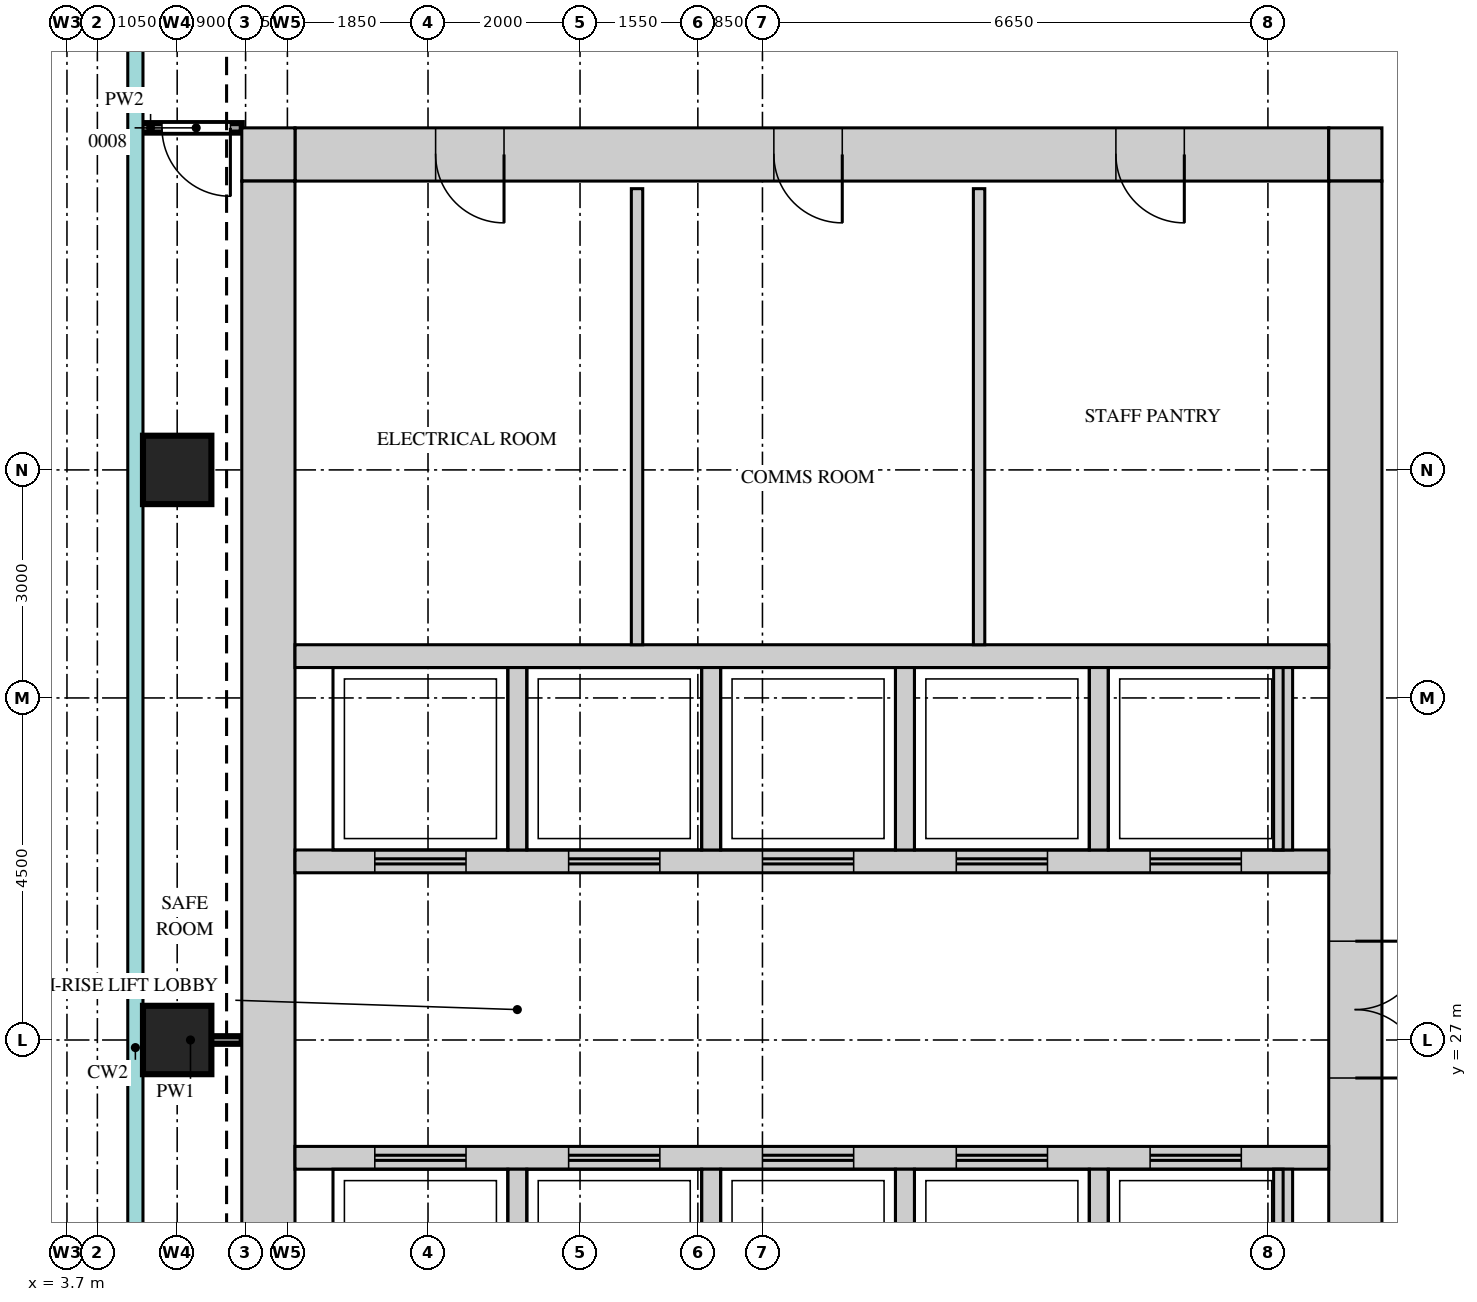
"""IFC4 building model, lengths in metres.
Left out: names, types, materials, properties, quantities, classifications, styles, units other than length and angle.
Written with IfcOpenShell. Run it as: python <this file> out.ifc"""

import sys

from ifc_helpers import new_model, si_unit, direction, frame, frame_2d, origin, origin_2d, place, context, subcontext, project, spatial, rectangle, extrude, source, transform, mapped, element, fill, save


model = new_model("IFC4")
c1 = context("Model", 3, precision=1e-05, world=origin(), true_north=direction((0.0, 1.0)))
c2 = subcontext(c1, "Body", "Model", "MODEL_VIEW")
j1 = project(units=[si_unit("LENGTHUNIT", "METRE"), si_unit("PLANEANGLEUNIT", "RADIAN")], contexts=[c1])
p1 = place(None, origin())
s1 = spatial("IfcSite", under=j1, at=p1, CompositionType="ELEMENT")
p2 = place(p1, origin())
s2 = spatial("IfcBuilding", under=s1, at=p2, CompositionType="ELEMENT")
p3 = place(p2, frame((0.0, 0.0, 238.2)))
s3 = spatial("IfcBuildingStorey", under=s2, at=p3, CompositionType="ELEMENT", Elevation=238.2)
m1 = source(origin(), c2, "Body", "SweptSolid", [
    extrude(rectangle(XDim=13.6, YDim=0.7, at=frame_2d((6.8, 0.0))), origin(), (0.0, 0.0, 1.0), 3.75),
])
p4 = place(p3, frame((6.7, 38.65, 0.0), z_axis=(0.0, 0.0, 1.0), x_axis=(1.0, 0.0, 0.0)))
e1 = element("IfcWall", 1, at=p4, inside=s3, PredefinedType="SHEAR", context=c2, shape_type="MappedRepresentation", body=[
    mapped(m1, transform((0.0, 0.0, 0.0))),
])
m2 = source(origin(), c2, "Body", "SweptSolid", [
    extrude(rectangle(XDim=0.9, YDim=2.1, at=frame_2d((0.45, 1.05))), frame((0.0, 0.36, 0.0), z_axis=(0.0, -1.0, 0.0), x_axis=(1.0, 0.0, 0.0)), (0.0, 0.0, 1.0), 0.72),
])
p5 = place(p4, frame((1.85, 0.0, 0.0)))
e2 = element("IfcOpeningElement", 2, at=p5, cuts=e1, PredefinedType="OPENING", context=c2, shape_type="MappedRepresentation", body=[
    mapped(m2, transform((0.0, 0.0, 0.0))),
])
p6 = place(p4, frame((6.3, 0.0, 0.0)))
e3 = element("IfcOpeningElement", 3, at=p6, cuts=e1, PredefinedType="OPENING", context=c2, shape_type="MappedRepresentation", body=[
    mapped(m2, transform((0.0, 0.0, 0.0))),
])
p7 = place(p4, frame((10.8, 0.0, 0.0)))
e4 = element("IfcOpeningElement", 4, at=p7, cuts=e1, PredefinedType="OPENING", context=c2, shape_type="MappedRepresentation", body=[
    mapped(m2, transform((0.0, 0.0, 0.0))),
])
m3 = source(origin(), c2, "Body", "SweptSolid", [
    extrude(rectangle(XDim=0.7, YDim=0.7, at=frame_2d((0.35, 0.0))), origin(), (0.0, 0.0, 1.0), 3.75),
])
for number, where, z_axis, x_axis in (
    (5, (20.3, 38.65, 0.0), (0.0, 0.0, 1.0), (1.0, 0.0, 0.0)),
    (6, (6.0, 38.65, 0.0), (0.0, 0.0, 1.0), (1.0, 0.0, 0.0)),
):
    element("IfcWall", number, at=place(p3, frame(where, z_axis=z_axis, x_axis=x_axis)), inside=s3, PredefinedType="SHEAR", context=c2, shape_type="MappedRepresentation", body=[
        mapped(m3, transform((0.0, 0.0, 0.0))),
    ])
m4 = source(origin(), c2, "Body", "SweptSolid", [
    extrude(rectangle(XDim=22.6, YDim=0.7, at=frame_2d((11.3, 0.0))), origin(), (0.0, 0.0, 1.0), 3.75),
])
p8 = place(p3, frame((20.65, 15.7, 0.0), z_axis=(0.0, 0.0, 1.0), x_axis=(0.0, 1.0, 0.0)))
e7 = element("IfcWall", 7, at=p8, inside=s3, PredefinedType="SHEAR", context=c2, shape_type="MappedRepresentation", body=[
    mapped(m4, transform((0.0, 0.0, 0.0))),
])
m5 = source(origin(), c2, "Body", "SweptSolid", [
    extrude(rectangle(XDim=1.8, YDim=2.1, at=frame_2d((0.9, 1.05))), frame((0.0, 0.36, 0.0), z_axis=(0.0, -1.0, 0.0), x_axis=(1.0, 0.0, 0.0)), (0.0, 0.0, 1.0), 0.72),
])
p9 = place(p8, frame((10.8, 0.0, 0.0)))
e8 = element("IfcOpeningElement", 8, at=p9, cuts=e7, PredefinedType="OPENING", context=c2, shape_type="MappedRepresentation", body=[
    mapped(m5, transform((0.0, 0.0, 0.0))),
])
p10 = place(p8, frame((0.45, 0.0, 0.0)))
e9 = element("IfcOpeningElement", 9, at=p10, cuts=e7, PredefinedType="OPENING", context=c2, shape_type="MappedRepresentation", body=[
    mapped(m2, transform((0.0, 0.0, 0.0))),
])
m6 = source(origin(), c2, "Body", "SweptSolid", [
    extrude(rectangle(XDim=1.0, YDim=2.1, at=frame_2d((0.5, 1.05))), frame((0.0, 0.36, 0.0), z_axis=(0.0, -1.0, 0.0), x_axis=(1.0, 0.0, 0.0)), (0.0, 0.0, 1.0), 0.72),
])
p11 = place(p8, frame((2.2, 0.0, 0.0)))
e10 = element("IfcOpeningElement", 10, at=p11, cuts=e7, PredefinedType="OPENING", context=c2, shape_type="MappedRepresentation", body=[
    mapped(m6, transform((0.0, 0.0, 0.0))),
])
p12 = place(p8, frame((5.0, 0.0, 0.0)))
e11 = element("IfcOpeningElement", 11, at=p12, cuts=e7, PredefinedType="OPENING", context=c2, shape_type="MappedRepresentation", body=[
    mapped(m2, transform((0.0, 0.0, 0.0))),
])
p13 = place(p3, frame((6.35, 15.7, 0.0), z_axis=(0.0, 0.0, 1.0), x_axis=(0.0, 1.0, 0.0)))
e12 = element("IfcWall", 12, at=p13, inside=s3, PredefinedType="SHEAR", context=c2, shape_type="MappedRepresentation", body=[
    mapped(m4, transform((0.0, 0.0, 0.0))),
])
m7 = source(origin(), c2, "Body", "SweptSolid", [
    extrude(rectangle(XDim=13.6, YDim=0.3, at=frame_2d((6.8, 0.0))), origin(), (0.0, 0.0, 1.0), 3.75),
])
p14 = place(p3, frame((6.7, 32.05, 0.0), z_axis=(0.0, 0.0, 1.0), x_axis=(1.0, 0.0, 0.0)))
e13 = element("IfcWall", 13, at=p14, inside=s3, PredefinedType="STANDARD", context=c2, shape_type="MappedRepresentation", body=[
    mapped(m7, transform((0.0, 0.0, 0.0))),
])
p15 = place(p3, frame((6.7, 29.35, 0.0), z_axis=(0.0, 0.0, 1.0), x_axis=(1.0, 0.0, 0.0)))
e14 = element("IfcWall", 14, at=p15, inside=s3, PredefinedType="STANDARD", context=c2, shape_type="MappedRepresentation", body=[
    mapped(m7, transform((0.0, 0.0, 0.0))),
])
m8 = source(origin(), c2, "Body", "SweptSolid", [
    extrude(rectangle(XDim=1.2, YDim=2.1, at=frame_2d((0.6, 1.05))), frame((0.0, 0.16, 0.0), z_axis=(0.0, -1.0, 0.0), x_axis=(1.0, 0.0, 0.0)), (0.0, 0.0, 1.0), 0.32),
])
p16 = place(p15, frame((1.05, 0.0, 0.0)))
e15 = element("IfcOpeningElement", 15, at=p16, cuts=e14, PredefinedType="OPENING", context=c2, shape_type="MappedRepresentation", body=[
    mapped(m8, transform((0.0, 0.0, 0.0))),
])
p17 = place(p15, frame((3.6, 0.0, 0.0)))
e16 = element("IfcOpeningElement", 16, at=p17, cuts=e14, PredefinedType="OPENING", context=c2, shape_type="MappedRepresentation", body=[
    mapped(m8, transform((0.0, 0.0, 0.0))),
])
p18 = place(p15, frame((6.15, 0.0, 0.0)))
e17 = element("IfcOpeningElement", 17, at=p18, cuts=e14, PredefinedType="OPENING", context=c2, shape_type="MappedRepresentation", body=[
    mapped(m8, transform((0.0, 0.0, 0.0))),
])
p19 = place(p15, frame((8.7, 0.0, 0.0)))
e18 = element("IfcOpeningElement", 18, at=p19, cuts=e14, PredefinedType="OPENING", context=c2, shape_type="MappedRepresentation", body=[
    mapped(m8, transform((0.0, 0.0, 0.0))),
])
p20 = place(p15, frame((11.25, 0.0, 0.0)))
e19 = element("IfcOpeningElement", 19, at=p20, cuts=e14, PredefinedType="OPENING", context=c2, shape_type="MappedRepresentation", body=[
    mapped(m8, transform((0.0, 0.0, 0.0))),
])
p21 = place(p3, frame((6.7, 25.45, 0.0), z_axis=(0.0, 0.0, 1.0), x_axis=(1.0, 0.0, 0.0)))
e20 = element("IfcWall", 20, at=p21, inside=s3, PredefinedType="STANDARD", context=c2, shape_type="MappedRepresentation", body=[
    mapped(m7, transform((0.0, 0.0, 0.0))),
])
p22 = place(p21, frame((1.05, 0.0, 0.0)))
e21 = element("IfcOpeningElement", 21, at=p22, cuts=e20, PredefinedType="OPENING", context=c2, shape_type="MappedRepresentation", body=[
    mapped(m8, transform((0.0, 0.0, 0.0))),
])
p23 = place(p21, frame((3.6, 0.0, 0.0)))
e22 = element("IfcOpeningElement", 22, at=p23, cuts=e20, PredefinedType="OPENING", context=c2, shape_type="MappedRepresentation", body=[
    mapped(m8, transform((0.0, 0.0, 0.0))),
])
p24 = place(p21, frame((6.15, 0.0, 0.0)))
e23 = element("IfcOpeningElement", 23, at=p24, cuts=e20, PredefinedType="OPENING", context=c2, shape_type="MappedRepresentation", body=[
    mapped(m8, transform((0.0, 0.0, 0.0))),
])
p25 = place(p21, frame((8.7, 0.0, 0.0)))
e24 = element("IfcOpeningElement", 24, at=p25, cuts=e20, PredefinedType="OPENING", context=c2, shape_type="MappedRepresentation", body=[
    mapped(m8, transform((0.0, 0.0, 0.0))),
])
p26 = place(p21, frame((11.25, 0.0, 0.0)))
e25 = element("IfcOpeningElement", 25, at=p26, cuts=e20, PredefinedType="OPENING", context=c2, shape_type="MappedRepresentation", body=[
    mapped(m8, transform((0.0, 0.0, 0.0))),
])
m9 = source(origin(), c2, "Body", "SweptSolid", [
    extrude(rectangle(XDim=2.4, YDim=0.25, at=frame_2d((1.2, 0.0))), origin(), (0.0, 0.0, 1.0), 3.75),
])
for number, where, z_axis, x_axis in (
    (26, (17.275, 29.5, 0.0), (0.0, 0.0, 1.0), (0.0, 1.0, 0.0)),
    (27, (19.7, 29.5, 0.0), (0.0, 0.0, 1.0), (0.0, 1.0, 0.0)),
    (28, (9.625, 29.5, 0.0), (0.0, 0.0, 1.0), (0.0, 1.0, 0.0)),
    (29, (12.175, 29.5, 0.0), (0.0, 0.0, 1.0), (0.0, 1.0, 0.0)),
    (30, (14.725, 29.5, 0.0), (0.0, 0.0, 1.0), (0.0, 1.0, 0.0)),
):
    element("IfcWall", number, at=place(p3, frame(where, z_axis=z_axis, x_axis=x_axis)), inside=s3, PredefinedType="STANDARD", context=c2, shape_type="MappedRepresentation", body=[
        mapped(m9, transform((0.0, 0.0, 0.0))),
    ])
m10 = source(origin(), c2, "Body", "SweptSolid", [
    extrude(rectangle(XDim=2.4, YDim=0.25, at=frame_2d((1.2, 0.0))), origin(), (0.0, 0.0, 1.0), 3.75),
])
for number, where, z_axis, x_axis in (
    (31, (17.275, 22.9, 0.0), (0.0, 0.0, 1.0), (0.0, 1.0, 0.0)),
    (32, (19.7, 22.9, 0.0), (0.0, 0.0, 1.0), (0.0, 1.0, 0.0)),
    (33, (9.625, 22.9, 0.0), (0.0, 0.0, 1.0), (0.0, 1.0, 0.0)),
    (34, (12.175, 22.9, 0.0), (0.0, 0.0, 1.0), (0.0, 1.0, 0.0)),
    (35, (14.725, 22.9, 0.0), (0.0, 0.0, 1.0), (0.0, 1.0, 0.0)),
):
    element("IfcWall", number, at=place(p3, frame(where, z_axis=z_axis, x_axis=x_axis)), inside=s3, PredefinedType="STANDARD", context=c2, shape_type="MappedRepresentation", body=[
        mapped(m10, transform((0.0, 0.0, 0.0))),
    ])
m11 = source(origin(), c2, "Body", "SweptSolid", [
    extrude(rectangle(XDim=0.9, YDim=0.9, at=origin_2d()), origin(), (0.0, 0.0, 1.0), 3.75),
])
for number, where, z_axis, x_axis in (
    (36, (5.15, 27.0, 0.0), (0.0, 0.0, 1.0), (1.0, 0.0, 0.0)),
    (37, (5.15, 34.5, 0.0), (0.0, 0.0, 1.0), (1.0, 0.0, 0.0)),
):
    element("IfcColumn", number, at=place(p3, frame(where, z_axis=z_axis, x_axis=x_axis)), inside=s3, PredefinedType="COLUMN", context=c2, shape_type="MappedRepresentation", body=[
        mapped(m11, transform((0.0, 0.0, 0.0))),
    ])
m12 = source(origin(), c2, "Body", "SweptSolid", [
    extrude(rectangle(XDim=1.35, YDim=0.1, at=frame_2d((0.675, 0.0))), origin(), (0.0, 0.0, 1.0), 3.8),
])
p27 = place(p3, frame((4.65, 27.0, 0.0), z_axis=(0.0, 0.0, 1.0), x_axis=(1.0, 0.0, 0.0)))
e38 = element("IfcWall", 38, at=p27, inside=s3, PredefinedType="PARTITIONING", context=c2, shape_type="MappedRepresentation", body=[
    mapped(m12, transform((0.0, 0.0, 0.0))),
])
m13 = source(origin(), c2, "Body", "SweptSolid", [
    extrude(rectangle(XDim=6.0, YDim=0.15, at=frame_2d((3.0, 0.0))), origin(), (0.0, 0.0, 1.0), 3.8),
])
for number, where, z_axis, x_axis in (
    (39, (11.2, 32.2, 0.0), (0.0, 0.0, 1.0), (0.0, 1.0, 0.0)),
    (40, (15.7, 32.2, 0.0), (0.0, 0.0, 1.0), (0.0, 1.0, 0.0)),
):
    element("IfcWall", number, at=place(p3, frame(where, z_axis=z_axis, x_axis=x_axis)), inside=s3, PredefinedType="PARTITIONING", context=c2, shape_type="MappedRepresentation", body=[
        mapped(m13, transform((0.0, 0.0, 0.0))),
    ])
m14 = source(origin(), c2, "Body", "SweptSolid", [
    extrude(rectangle(XDim=1.35, YDim=0.125, at=frame_2d((0.675, 0.0))), origin(), (0.0, 0.0, 1.0), 3.8),
])
p28 = place(p3, frame((4.65, 39.0, 0.0), z_axis=(0.0, 0.0, 1.0), x_axis=(1.0, 0.0, 0.0)))
e41 = element("IfcWall", 41, at=p28, inside=s3, PredefinedType="PARTITIONING", context=c2, shape_type="MappedRepresentation", body=[
    mapped(m14, transform((0.0, 0.0, 0.0))),
])
m15 = source(origin(), c2, "Body", "SweptSolid", [
    extrude(rectangle(XDim=0.9, YDim=2.1, at=frame_2d((0.45, 1.05))), frame((0.0, 0.073, 0.0), z_axis=(0.0, -1.0, 0.0), x_axis=(1.0, 0.0, 0.0)), (0.0, 0.0, 1.0), 0.145),
])
p29 = place(p28, frame((0.3, 0.0, 0.0)))
e42 = element("IfcOpeningElement", 42, at=p29, cuts=e41, PredefinedType="OPENING", context=c2, shape_type="MappedRepresentation", body=[
    mapped(m15, transform((0.0, 0.0, 0.0))),
])
m16 = source(origin(), c2, "Body", "SweptSolid", [
    extrude(rectangle(XDim=1.8, YDim=2.1, at=frame_2d((0.9, 1.05))), frame((0.0, 0.3, 0.0), z_axis=(0.0, -1.0, 0.0), x_axis=(1.0, 0.0, 0.0)), (0.0, 0.0, 1.0), 0.6),
])
p30 = place(p9, origin())
e43 = element("IfcDoor", 43, at=p30, inside=s3, OperationType="DOUBLE_DOOR_SINGLE_SWING", PredefinedType="DOOR", context=c2, shape_type="MappedRepresentation", body=[
    mapped(m16, transform((0.0, 0.0, 0.0))),
])
fill(e8, e43)
m17 = source(origin(), c2, "Body", "SweptSolid", [
    extrude(rectangle(XDim=0.9, YDim=2.1, at=frame_2d((0.45, 1.05))), frame((0.0, 0.3, 0.0), z_axis=(0.0, -1.0, 0.0), x_axis=(1.0, 0.0, 0.0)), (0.0, 0.0, 1.0), 0.6),
])
p31 = place(p5, origin())
e44 = element("IfcDoor", 44, at=p31, inside=s3, OperationType="SINGLE_SWING_RIGHT", PredefinedType="DOOR", context=c2, shape_type="MappedRepresentation", body=[
    mapped(m17, transform((0.0, 0.0, 0.0))),
])
fill(e2, e44)
p32 = place(p6, origin())
e45 = element("IfcDoor", 45, at=p32, inside=s3, OperationType="SINGLE_SWING_RIGHT", PredefinedType="DOOR", context=c2, shape_type="MappedRepresentation", body=[
    mapped(m17, transform((0.0, 0.0, 0.0))),
])
fill(e3, e45)
p33 = place(p7, origin())
e46 = element("IfcDoor", 46, at=p33, inside=s3, OperationType="SINGLE_SWING_RIGHT", PredefinedType="DOOR", context=c2, shape_type="MappedRepresentation", body=[
    mapped(m17, transform((0.0, 0.0, 0.0))),
])
fill(e4, e46)
m18 = source(origin(), c2, "Body", "SweptSolid", [
    extrude(rectangle(XDim=0.9, YDim=2.1, at=frame_2d((0.45, 1.05))), frame((0.0, 0.025, 0.0), z_axis=(0.0, -1.0, 0.0), x_axis=(1.0, 0.0, 0.0)), (0.0, 0.0, 1.0), 0.05),
])
p34 = place(p29, origin())
e47 = element("IfcDoor", 47, at=p34, inside=s3, OperationType="SINGLE_SWING_RIGHT", PredefinedType="DOOR", context=c2, shape_type="MappedRepresentation", body=[
    mapped(m18, transform((0.0, 0.0, 0.0))),
])
fill(e42, e47)
m19 = source(origin(), c2, "Body", "SweptSolid", [
    extrude(rectangle(XDim=1.2, YDim=2.1, at=frame_2d((0.6, 1.05))), frame((0.0, 0.025, 0.0), z_axis=(0.0, -1.0, 0.0), x_axis=(1.0, 0.0, 0.0)), (0.0, 0.0, 1.0), 0.05),
])
p35 = place(p22, origin())
e48 = element("IfcDoor", 48, at=p35, inside=s3, OperationType="DOUBLE_DOOR_SLIDING", PredefinedType="DOOR", context=c2, shape_type="MappedRepresentation", body=[
    mapped(m19, transform((0.0, 0.0, 0.0))),
])
fill(e21, e48)
p36 = place(p23, origin())
e49 = element("IfcDoor", 49, at=p36, inside=s3, OperationType="DOUBLE_DOOR_SLIDING", PredefinedType="DOOR", context=c2, shape_type="MappedRepresentation", body=[
    mapped(m19, transform((0.0, 0.0, 0.0))),
])
fill(e22, e49)
p37 = place(p24, origin())
e50 = element("IfcDoor", 50, at=p37, inside=s3, OperationType="DOUBLE_DOOR_SLIDING", PredefinedType="DOOR", context=c2, shape_type="MappedRepresentation", body=[
    mapped(m19, transform((0.0, 0.0, 0.0))),
])
fill(e23, e50)
p38 = place(p25, origin())
e51 = element("IfcDoor", 51, at=p38, inside=s3, OperationType="DOUBLE_DOOR_SLIDING", PredefinedType="DOOR", context=c2, shape_type="MappedRepresentation", body=[
    mapped(m19, transform((0.0, 0.0, 0.0))),
])
fill(e24, e51)
p39 = place(p26, origin())
e52 = element("IfcDoor", 52, at=p39, inside=s3, OperationType="DOUBLE_DOOR_SLIDING", PredefinedType="DOOR", context=c2, shape_type="MappedRepresentation", body=[
    mapped(m19, transform((0.0, 0.0, 0.0))),
])
fill(e25, e52)
p40 = place(p16, origin())
e53 = element("IfcDoor", 53, at=p40, inside=s3, OperationType="DOUBLE_DOOR_SLIDING", PredefinedType="DOOR", context=c2, shape_type="MappedRepresentation", body=[
    mapped(m19, transform((0.0, 0.0, 0.0))),
])
fill(e15, e53)
p41 = place(p17, origin())
e54 = element("IfcDoor", 54, at=p41, inside=s3, OperationType="DOUBLE_DOOR_SLIDING", PredefinedType="DOOR", context=c2, shape_type="MappedRepresentation", body=[
    mapped(m19, transform((0.0, 0.0, 0.0))),
])
fill(e16, e54)
p42 = place(p18, origin())
e55 = element("IfcDoor", 55, at=p42, inside=s3, OperationType="DOUBLE_DOOR_SLIDING", PredefinedType="DOOR", context=c2, shape_type="MappedRepresentation", body=[
    mapped(m19, transform((0.0, 0.0, 0.0))),
])
fill(e17, e55)
p43 = place(p19, origin())
e56 = element("IfcDoor", 56, at=p43, inside=s3, OperationType="DOUBLE_DOOR_SLIDING", PredefinedType="DOOR", context=c2, shape_type="MappedRepresentation", body=[
    mapped(m19, transform((0.0, 0.0, 0.0))),
])
fill(e18, e56)
p44 = place(p20, origin())
e57 = element("IfcDoor", 57, at=p44, inside=s3, OperationType="DOUBLE_DOOR_SLIDING", PredefinedType="DOOR", context=c2, shape_type="MappedRepresentation", body=[
    mapped(m19, transform((0.0, 0.0, 0.0))),
])
fill(e19, e57)
save(model, sys.argv[1])
